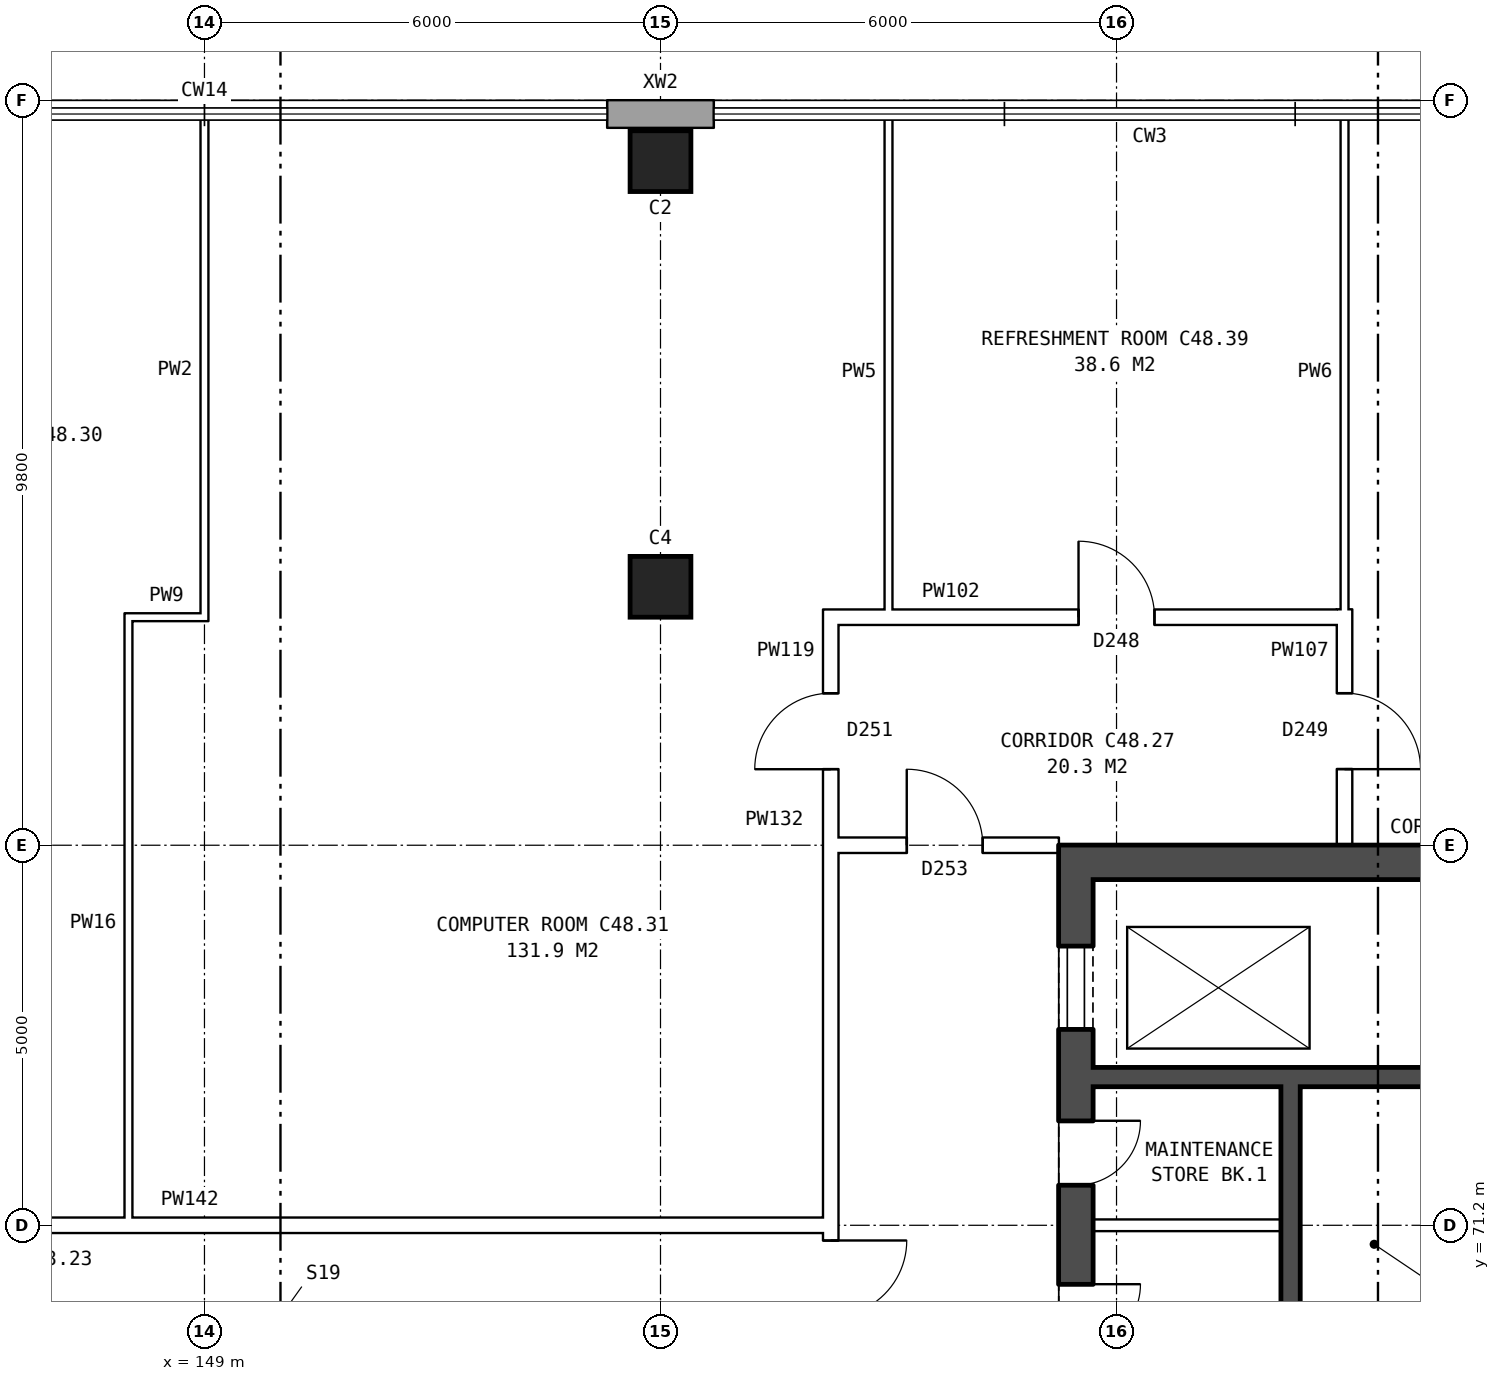
"""IFC4 building model, lengths in metres.
Left out: names, types, materials, properties, quantities, classifications, styles, units other than length and angle.
Written with IfcOpenShell. Run it as: python <this file> out.ifc"""

import sys

from ifc_helpers import new_model, si_unit, direction, frame, frame_2d, origin, origin_2d, place, context, subcontext, project, spatial, rectangle, extrude, element, fill, save


model = new_model("IFC4")
c1 = context("Model", 3, precision=1e-05, world=origin(), true_north=direction((0.0, 1.0)))
c2 = subcontext(c1, "Body", "Model", "MODEL_VIEW")
j1 = project(units=[si_unit("LENGTHUNIT", "METRE"), si_unit("PLANEANGLEUNIT", "RADIAN")], contexts=[c1])
p1 = place(None, origin())
s1 = spatial("IfcSite", under=j1, at=p1, CompositionType="ELEMENT")
p2 = place(p1, origin())
s2 = spatial("IfcBuilding", under=s1, at=p2, CompositionType="ELEMENT")
p3 = place(p2, frame((0.0, 0.0, 171.6)))
s3 = spatial("IfcBuildingStorey", under=s2, at=p3, CompositionType="ELEMENT", Elevation=171.6)
for number, where, z_axis, x_axis in (
    (1, (155.0, 79.6, 0.0), (0.0, 0.0, 1.0), (1.0, 0.0, 0.0)),
    (2, (155.0, 85.2, 0.0), (0.0, 0.0, 1.0), (1.0, 0.0, 0.0)),
):
    element("IfcColumn", number, at=place(p3, frame(where, z_axis=z_axis, x_axis=x_axis)), inside=s3, PredefinedType="COLUMN", context=c2, shape_type="SweptSolid", body=[
        extrude(rectangle(XDim=0.8, YDim=0.8, at=origin_2d()), origin(), (0.0, 0.0, 1.0), 3.6),
    ])
p4 = place(p3, frame((155.7, 85.82, 0.0), z_axis=(0.0, 0.0, 1.0), x_axis=(-1.0, 0.0, 0.0)))
e3 = element("IfcWall", 3, at=p4, inside=s3, PredefinedType="STANDARD", context=c2, shape_type="SweptSolid", body=[
    extrude(rectangle(XDim=1.4, YDim=0.36, at=frame_2d((0.7, 0.0))), origin(), (0.0, 0.0, 1.0), 3.6),
])
p5 = place(p3, frame((160.465, 76.2, 0.0), z_axis=(0.0, 0.0, 1.0), x_axis=(0.0, -1.0, 0.0)))
e4 = element("IfcWall", 4, at=p5, inside=s3, PredefinedType="SHEAR", context=c2, shape_type="SweptSolid", body=[
    extrude(rectangle(XDim=12.4, YDim=0.45, at=frame_2d((6.2, 0.0))), origin(), (0.0, 0.0, 1.0), 3.6),
])
p6 = place(p5, frame((1.325, 0.0, 0.0)))
e5 = element("IfcOpeningElement", 5, at=p6, cuts=e4, PredefinedType="OPENING", context=c2, shape_type="SweptSolid", body=[
    extrude(rectangle(XDim=1.1, YDim=2.1, at=frame_2d((0.55, 1.05))), frame((0.0, 0.235, 0.0), z_axis=(0.0, -1.0, 0.0), x_axis=(1.0, 0.0, 0.0)), (0.0, 0.0, 1.0), 0.47),
])
p7 = place(p5, frame((3.625, 0.0, 0.0)))
e6 = element("IfcOpeningElement", 6, at=p7, cuts=e4, PredefinedType="OPENING", context=c2, shape_type="SweptSolid", body=[
    extrude(rectangle(XDim=0.85, YDim=2.1, at=frame_2d((0.425, 1.05))), frame((0.0, 0.235, 0.0), z_axis=(0.0, -1.0, 0.0), x_axis=(1.0, 0.0, 0.0)), (0.0, 0.0, 1.0), 0.47),
])
p8 = place(p5, frame((5.775, 0.0, 0.0)))
e7 = element("IfcOpeningElement", 7, at=p8, cuts=e4, PredefinedType="OPENING", context=c2, shape_type="SweptSolid", body=[
    extrude(rectangle(XDim=0.85, YDim=2.1, at=frame_2d((0.425, 1.05))), frame((0.0, 0.235, 0.0), z_axis=(0.0, -1.0, 0.0), x_axis=(1.0, 0.0, 0.0)), (0.0, 0.0, 1.0), 0.47),
])
p9 = place(p5, frame((9.9, 0.0, 0.0)))
e8 = element("IfcOpeningElement", 8, at=p9, cuts=e4, PredefinedType="OPENING", context=c2, shape_type="SweptSolid", body=[
    extrude(rectangle(XDim=1.1, YDim=2.1, at=frame_2d((0.55, 1.05))), frame((0.0, 0.235, 0.0), z_axis=(0.0, -1.0, 0.0), x_axis=(1.0, 0.0, 0.0)), (0.0, 0.0, 1.0), 0.47),
])
p10 = place(p5, frame((8.125, 0.0, 0.0)))
e9 = element("IfcOpeningElement", 9, at=p10, cuts=e4, PredefinedType="OPENING", context=c2, shape_type="SweptSolid", body=[
    extrude(rectangle(XDim=0.85, YDim=2.1, at=frame_2d((0.425, 1.05))), frame((0.0, 0.235, 0.0), z_axis=(0.0, -1.0, 0.0), x_axis=(1.0, 0.0, 0.0)), (0.0, 0.0, 1.0), 0.47),
])
p11 = place(p3, frame((160.69, 75.975, 0.0), z_axis=(0.0, 0.0, 1.0), x_axis=(1.0, 0.0, 0.0)))
e10 = element("IfcWall", 10, at=p11, inside=s3, PredefinedType="SHEAR", context=c2, shape_type="SweptSolid", body=[
    extrude(rectangle(XDim=7.5, YDim=0.45, at=frame_2d((3.75, 0.0))), origin(), (0.0, 0.0, 1.0), 3.6),
])
p12 = place(p3, frame((160.69, 73.15, 0.0), z_axis=(0.0, 0.0, 1.0), x_axis=(1.0, 0.0, 0.0)))
e11 = element("IfcWall", 11, at=p12, inside=s3, PredefinedType="SHEAR", context=c2, shape_type="SweptSolid", body=[
    extrude(rectangle(XDim=4.675, YDim=0.25, at=frame_2d((2.337, 0.0))), origin(), (0.0, 0.0, 1.0), 3.6),
])
p13 = place(p3, frame((160.69, 71.2, 0.0), z_axis=(0.0, 0.0, 1.0), x_axis=(1.0, 0.0, 0.0)))
e12 = element("IfcWall", 12, at=p13, inside=s3, PredefinedType="PARTITIONING", context=c2, shape_type="SweptSolid", body=[
    extrude(rectangle(XDim=2.475, YDim=0.15, at=frame_2d((1.238, 0.0))), origin(), (0.0, 0.0, 1.0), 3.6),
])
p14 = place(p3, frame((163.29, 73.025, 0.0), z_axis=(0.0, 0.0, 1.0), x_axis=(0.0, -1.0, 0.0)))
e13 = element("IfcWall", 13, at=p14, inside=s3, PredefinedType="SHEAR", context=c2, shape_type="SweptSolid", body=[
    extrude(rectangle(XDim=4.15, YDim=0.25, at=frame_2d((2.075, 0.0))), origin(), (0.0, 0.0, 1.0), 3.6),
])
p15 = place(p3, frame((157.24, 63.9, 0.0), z_axis=(0.0, 0.0, 1.0), x_axis=(0.0, 1.0, 0.0)))
e14 = element("IfcWall", 14, at=p15, inside=s3, PredefinedType="PARTITIONING", context=c2, shape_type="SweptSolid", body=[
    extrude(rectangle(XDim=12.2, YDim=0.2, at=frame_2d((6.1, 0.0))), origin(), (0.0, 0.0, 1.0), 3.6),
])
p16 = place(p15, frame((5.1, 0.0, 0.0)))
e15 = element("IfcOpeningElement", 15, at=p16, cuts=e14, PredefinedType="OPENING", context=c2, shape_type="SweptSolid", body=[
    extrude(rectangle(XDim=2.0, YDim=2.1, at=frame_2d((1.0, 1.05))), frame((0.0, 0.11, 0.0), z_axis=(0.0, -1.0, 0.0), x_axis=(1.0, 0.0, 0.0)), (0.0, 0.0, 1.0), 0.22),
])
p17 = place(p3, frame((142.76, 71.2, 0.0), z_axis=(0.0, 0.0, 1.0), x_axis=(1.0, 0.0, 0.0)))
e16 = element("IfcWall", 16, at=p17, inside=s3, PredefinedType="PARTITIONING", context=c2, shape_type="SweptSolid", body=[
    extrude(rectangle(XDim=14.48, YDim=0.2, at=frame_2d((7.24, 0.0))), origin(), (0.0, 0.0, 1.0), 3.6),
])
p18 = place(p3, frame((157.14, 76.2, 0.0), z_axis=(0.0, 0.0, 1.0), x_axis=(1.0, 0.0, 0.0)))
e17 = element("IfcWall", 17, at=p18, inside=s3, PredefinedType="PARTITIONING", context=c2, shape_type="SweptSolid", body=[
    extrude(rectangle(XDim=3.1, YDim=0.2, at=frame_2d((1.55, 0.0))), origin(), (0.0, 0.0, 1.0), 3.6),
])
p19 = place(p18, frame((1.1, 0.0, 0.0)))
e18 = element("IfcOpeningElement", 18, at=p19, cuts=e17, PredefinedType="OPENING", context=c2, shape_type="SweptSolid", body=[
    extrude(rectangle(XDim=1.0, YDim=2.1, at=frame_2d((0.5, 1.05))), frame((0.0, 0.11, 0.0), z_axis=(0.0, -1.0, 0.0), x_axis=(1.0, 0.0, 0.0)), (0.0, 0.0, 1.0), 0.22),
])
p20 = place(p3, frame((157.14, 79.2, 0.0), z_axis=(0.0, 0.0, 1.0), x_axis=(1.0, 0.0, 0.0)))
e19 = element("IfcWall", 19, at=p20, inside=s3, PredefinedType="PARTITIONING", context=c2, shape_type="SweptSolid", body=[
    extrude(rectangle(XDim=6.96, YDim=0.2, at=frame_2d((3.48, 0.0))), origin(), (0.0, 0.0, 1.0), 3.6),
])
p21 = place(p20, frame((3.36, 0.0, 0.0)))
e20 = element("IfcOpeningElement", 20, at=p21, cuts=e19, PredefinedType="OPENING", context=c2, shape_type="SweptSolid", body=[
    extrude(rectangle(XDim=1.0, YDim=2.1, at=frame_2d((0.5, 1.05))), frame((0.0, 0.11, 0.0), z_axis=(0.0, -1.0, 0.0), x_axis=(1.0, 0.0, 0.0)), (0.0, 0.0, 1.0), 0.22),
])
p22 = place(p3, frame((147.95, 79.2, 0.0), z_axis=(0.0, 0.0, 1.0), x_axis=(1.0, 0.0, 0.0)))
e21 = element("IfcWall", 21, at=p22, inside=s3, PredefinedType="PARTITIONING", context=c2, shape_type="SweptSolid", body=[
    extrude(rectangle(XDim=1.1, YDim=0.1, at=frame_2d((0.55, 0.0))), origin(), (0.0, 0.0, 1.0), 3.6),
])
p23 = place(p3, frame((148.0, 71.1, 0.0), z_axis=(0.0, 0.0, 1.0), x_axis=(0.0, 1.0, 0.0)))
e22 = element("IfcWall", 22, at=p23, inside=s3, PredefinedType="PARTITIONING", context=c2, shape_type="SweptSolid", body=[
    extrude(rectangle(XDim=8.15, YDim=0.1, at=frame_2d((4.075, 0.0))), origin(), (0.0, 0.0, 1.0), 3.6),
])
p24 = place(p3, frame((149.0, 79.15, 0.0), z_axis=(0.0, 0.0, 1.0), x_axis=(0.0, 1.0, 0.0)))
e23 = element("IfcWall", 23, at=p24, inside=s3, PredefinedType="PARTITIONING", context=c2, shape_type="SweptSolid", body=[
    extrude(rectangle(XDim=6.61, YDim=0.1, at=frame_2d((3.305, 0.0))), origin(), (0.0, 0.0, 1.0), 3.6),
])
p25 = place(p3, frame((157.24, 76.1, 0.0), z_axis=(0.0, 0.0, 1.0), x_axis=(0.0, 1.0, 0.0)))
e24 = element("IfcWall", 24, at=p25, inside=s3, PredefinedType="PARTITIONING", context=c2, shape_type="SweptSolid", body=[
    extrude(rectangle(XDim=3.2, YDim=0.2, at=frame_2d((1.6, 0.0))), origin(), (0.0, 0.0, 1.0), 3.6),
])
p26 = place(p25, frame((1.1, 0.0, 0.0)))
e25 = element("IfcOpeningElement", 25, at=p26, cuts=e24, PredefinedType="OPENING", context=c2, shape_type="SweptSolid", body=[
    extrude(rectangle(XDim=1.0, YDim=2.1, at=frame_2d((0.5, 1.05))), frame((0.0, 0.11, 0.0), z_axis=(0.0, -1.0, 0.0), x_axis=(1.0, 0.0, 0.0)), (0.0, 0.0, 1.0), 0.22),
])
p27 = place(p3, frame((158.0, 79.1, 0.0), z_axis=(0.0, 0.0, 1.0), x_axis=(0.0, 1.0, 0.0)))
e26 = element("IfcWall", 26, at=p27, inside=s3, PredefinedType="PARTITIONING", context=c2, shape_type="SweptSolid", body=[
    extrude(rectangle(XDim=6.66, YDim=0.1, at=frame_2d((3.33, 0.0))), origin(), (0.0, 0.0, 1.0), 3.6),
])
p28 = place(p3, frame((164.0, 76.2, 0.0), z_axis=(0.0, 0.0, 1.0), x_axis=(0.0, 1.0, 0.0)))
e27 = element("IfcWall", 27, at=p28, inside=s3, PredefinedType="PARTITIONING", context=c2, shape_type="SweptSolid", body=[
    extrude(rectangle(XDim=3.102, YDim=0.2, at=frame_2d((1.551, 0.0))), origin(), (0.0, 0.0, 1.0), 3.6),
])
p29 = place(p28, frame((1.001, 0.0, 0.0)))
e28 = element("IfcOpeningElement", 28, at=p29, cuts=e27, PredefinedType="OPENING", context=c2, shape_type="SweptSolid", body=[
    extrude(rectangle(XDim=1.0, YDim=2.1, at=frame_2d((0.5, 1.05))), frame((0.0, 0.11, 0.0), z_axis=(0.0, -1.0, 0.0), x_axis=(1.0, 0.0, 0.0)), (0.0, 0.0, 1.0), 0.22),
])
p30 = place(p3, frame((164.0, 79.098, 0.0), z_axis=(0.0, 0.0, 1.0), x_axis=(0.0, 1.0, 0.0)))
e29 = element("IfcWall", 29, at=p30, inside=s3, PredefinedType="PARTITIONING", context=c2, shape_type="SweptSolid", body=[
    extrude(rectangle(XDim=6.662, YDim=0.1, at=frame_2d((3.331, 0.0))), origin(), (0.0, 0.0, 1.0), 3.6),
])
p31 = place(p6, origin())
e30 = element("IfcDoor", 30, at=p31, inside=s3, OperationType="DOUBLE_DOOR_SLIDING", PredefinedType="DOOR", context=c2, shape_type="SweptSolid", body=[
    extrude(rectangle(XDim=1.1, YDim=2.1, at=frame_2d((0.55, 1.05))), frame((0.0, 0.21, 0.0), z_axis=(0.0, -1.0, 0.0), x_axis=(1.0, 0.0, 0.0)), (0.0, 0.0, 1.0), 0.05),
])
fill(e5, e30)
p32 = place(p7, origin())
e31 = element("IfcDoor", 31, at=p32, inside=s3, OperationType="SINGLE_SWING_LEFT", PredefinedType="DOOR", context=c2, shape_type="SweptSolid", body=[
    extrude(rectangle(XDim=0.85, YDim=2.1, at=frame_2d((0.425, 1.05))), frame((0.0, 0.21, 0.0), z_axis=(0.0, -1.0, 0.0), x_axis=(1.0, 0.0, 0.0)), (0.0, 0.0, 1.0), 0.05),
])
fill(e6, e31)
p33 = place(p8, origin())
e32 = element("IfcDoor", 32, at=p33, inside=s3, OperationType="SINGLE_SWING_LEFT", PredefinedType="DOOR", context=c2, shape_type="SweptSolid", body=[
    extrude(rectangle(XDim=0.85, YDim=2.1, at=frame_2d((0.425, 1.05))), frame((0.0, 0.21, 0.0), z_axis=(0.0, -1.0, 0.0), x_axis=(1.0, 0.0, 0.0)), (0.0, 0.0, 1.0), 0.05),
])
fill(e7, e32)
p34 = place(p16, frame((2.0, 0.0, 0.0), z_axis=(0.0, 0.0, 1.0), x_axis=(-1.0, 0.0, 0.0)))
e33 = element("IfcDoor", 33, at=p34, inside=s3, OperationType="DOUBLE_DOOR_SINGLE_SWING", PredefinedType="DOOR", context=c2, shape_type="SweptSolid", body=[
    extrude(rectangle(XDim=2.0, YDim=2.1, at=frame_2d((1.0, 1.05))), frame((0.0, 0.025, 0.0), z_axis=(0.0, -1.0, 0.0), x_axis=(1.0, 0.0, 0.0)), (0.0, 0.0, 1.0), 0.05),
])
fill(e15, e33)
p35 = place(p19, origin())
e34 = element("IfcDoor", 34, at=p35, inside=s3, OperationType="SINGLE_SWING_LEFT", PredefinedType="DOOR", context=c2, shape_type="SweptSolid", body=[
    extrude(rectangle(XDim=1.0, YDim=2.1, at=frame_2d((0.5, 1.05))), frame((0.0, 0.025, 0.0), z_axis=(0.0, -1.0, 0.0), x_axis=(1.0, 0.0, 0.0)), (0.0, 0.0, 1.0), 0.05),
])
fill(e18, e34)
p36 = place(p21, origin())
e35 = element("IfcDoor", 35, at=p36, inside=s3, OperationType="SINGLE_SWING_LEFT", PredefinedType="DOOR", context=c2, shape_type="SweptSolid", body=[
    extrude(rectangle(XDim=1.0, YDim=2.1, at=frame_2d((0.5, 1.05))), frame((0.0, 0.025, 0.0), z_axis=(0.0, -1.0, 0.0), x_axis=(1.0, 0.0, 0.0)), (0.0, 0.0, 1.0), 0.05),
])
fill(e20, e35)
p37 = place(p26, origin())
e36 = element("IfcDoor", 36, at=p37, inside=s3, OperationType="SINGLE_SWING_LEFT", PredefinedType="DOOR", context=c2, shape_type="SweptSolid", body=[
    extrude(rectangle(XDim=1.0, YDim=2.1, at=frame_2d((0.5, 1.05))), frame((0.0, 0.025, 0.0), z_axis=(0.0, -1.0, 0.0), x_axis=(1.0, 0.0, 0.0)), (0.0, 0.0, 1.0), 0.05),
])
fill(e25, e36)
p38 = place(p29, frame((1.0, 0.0, 0.0), z_axis=(0.0, 0.0, 1.0), x_axis=(-1.0, 0.0, 0.0)))
e37 = element("IfcDoor", 37, at=p38, inside=s3, OperationType="SINGLE_SWING_RIGHT", PredefinedType="DOOR", context=c2, shape_type="SweptSolid", body=[
    extrude(rectangle(XDim=1.0, YDim=2.1, at=frame_2d((0.5, 1.05))), frame((0.0, 0.025, 0.0), z_axis=(0.0, -1.0, 0.0), x_axis=(1.0, 0.0, 0.0)), (0.0, 0.0, 1.0), 0.05),
])
fill(e28, e37)
save(model, sys.argv[1])
